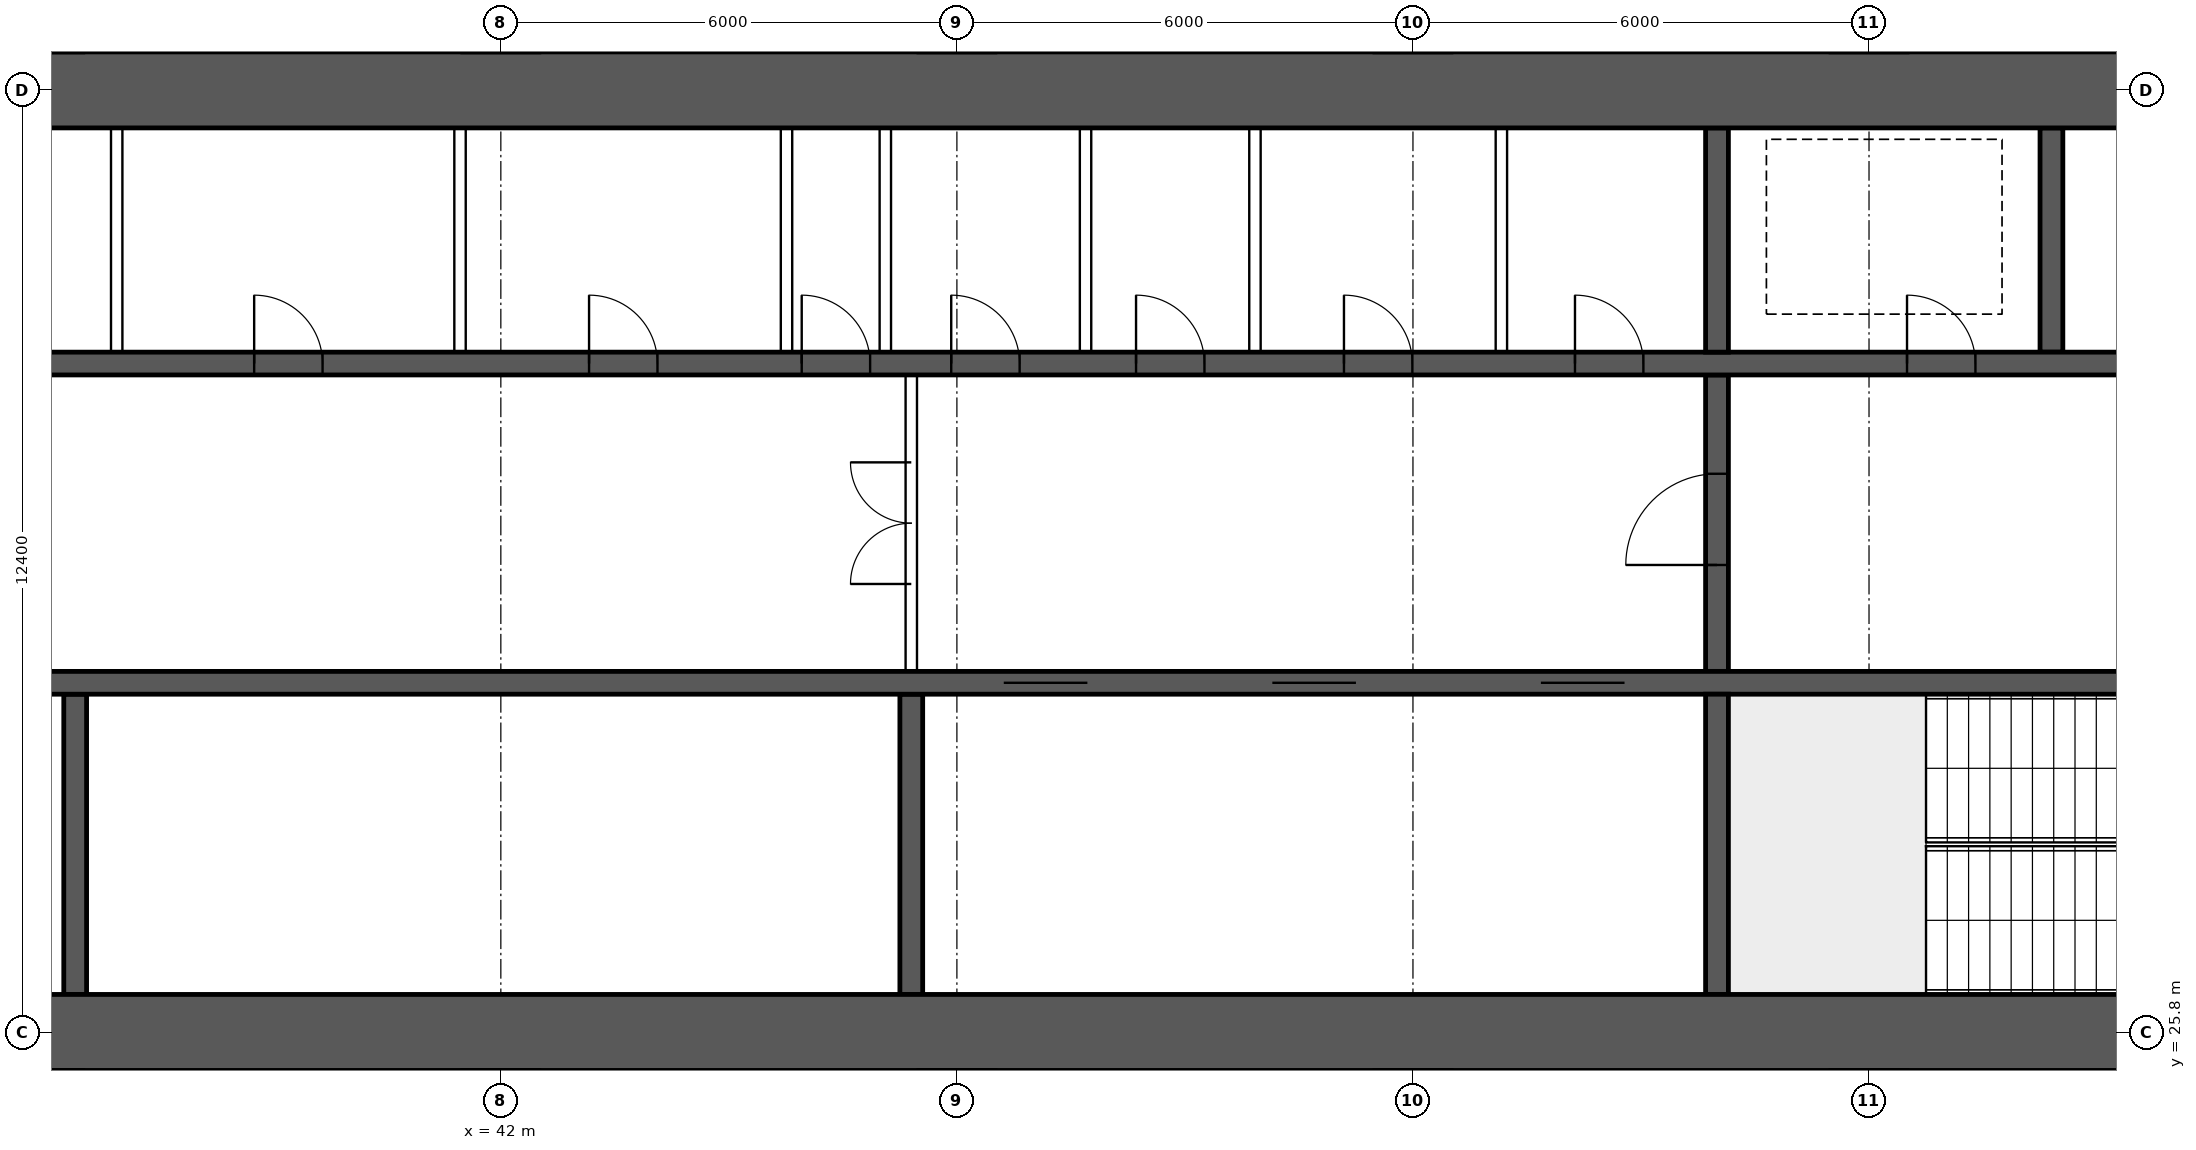
"""IFC4 building model, lengths in metres.
Left out: names, types, materials, properties, quantities, classifications, styles, units other than length and angle.
Written with IfcOpenShell. Run it as: python <this file> out.ifc"""

import sys

from ifc_helpers import new_model, si_unit, direction, frame, frame_2d, origin, place, context, subcontext, project, spatial, rectangle, extrude, element, fill, save


model = new_model("IFC4")
c1 = context("Model", 3, precision=1e-05, world=origin(), true_north=direction((0.0, 1.0)))
c2 = subcontext(c1, "Body", "Model", "MODEL_VIEW")
j1 = project(units=[si_unit("LENGTHUNIT", "METRE"), si_unit("PLANEANGLEUNIT", "RADIAN")], contexts=[c1])
p1 = place(None, origin())
s1 = spatial("IfcSite", under=j1, at=p1, CompositionType="ELEMENT")
p2 = place(p1, origin())
s2 = spatial("IfcBuilding", under=s1, at=p2, CompositionType="ELEMENT")
p3 = place(p2, frame((0.0, 0.0, 27.7)))
s3 = spatial("IfcBuildingStorey", under=s2, at=p3, CompositionType="ELEMENT", Elevation=27.7)
for number, where, z_axis, x_axis in (
    (1, (18.0, 25.8, 0.0), (0.0, 0.0, 1.0), (1.0, 0.0, 0.0)),
    (2, (18.0, 38.2, 0.0), (0.0, 0.0, 1.0), (1.0, 0.0, 0.0)),
):
    element("IfcWall", number, at=place(p3, frame(where, z_axis=z_axis, x_axis=x_axis)), inside=s3, PredefinedType="SHEAR", context=c2, shape_type="SweptSolid", body=[
        extrude(rectangle(XDim=48.0, YDim=1.0, at=frame_2d((24.0, 0.0))), origin(), (0.0, 0.0, 1.0), 3.75),
    ])
p4 = place(p3, frame((18.5, 30.4, 0.0), z_axis=(0.0, 0.0, 1.0), x_axis=(1.0, 0.0, 0.0)))
e3 = element("IfcWall", 3, at=p4, inside=s3, PredefinedType="SHEAR", context=c2, shape_type="SweptSolid", body=[
    extrude(rectangle(XDim=47.0, YDim=0.3, at=frame_2d((23.5, 0.0))), origin(), (0.0, 0.0, 1.0), 3.75),
])
p5 = place(p4, frame((0.4, 0.0, 0.0)))
e4 = element("IfcOpeningElement", 4, at=p5, cuts=e3, PredefinedType="OPENING", context=c2, shape_type="SweptSolid", body=[
    extrude(rectangle(XDim=1.0, YDim=2.1, at=frame_2d((0.5, 1.05))), frame((0.0, 0.16, 0.0), z_axis=(0.0, -1.0, 0.0), x_axis=(1.0, 0.0, 0.0)), (0.0, 0.0, 1.0), 0.32),
])
p6 = place(p4, frame((45.6, 0.0, 0.0)))
e5 = element("IfcOpeningElement", 5, at=p6, cuts=e3, PredefinedType="OPENING", context=c2, shape_type="SweptSolid", body=[
    extrude(rectangle(XDim=1.0, YDim=2.1, at=frame_2d((0.5, 1.05))), frame((0.0, 0.16, 0.0), z_axis=(0.0, -1.0, 0.0), x_axis=(1.0, 0.0, 0.0)), (0.0, 0.0, 1.0), 0.32),
])
p7 = place(p4, frame((8.25, 0.0, 0.0)))
e6 = element("IfcOpeningElement", 6, at=p7, cuts=e3, PredefinedType="OPENING", context=c2, shape_type="SweptSolid", body=[
    extrude(rectangle(XDim=1.1, YDim=2.1, at=frame_2d((0.55, 1.05))), frame((0.0, 0.16, 0.0), z_axis=(0.0, -1.0, 0.0), x_axis=(1.0, 0.0, 0.0)), (0.0, 0.0, 1.0), 0.32),
])
p8 = place(p4, frame((10.85, 0.0, 0.0)))
e7 = element("IfcOpeningElement", 7, at=p8, cuts=e3, PredefinedType="OPENING", context=c2, shape_type="SweptSolid", body=[
    extrude(rectangle(XDim=1.1, YDim=2.1, at=frame_2d((0.55, 1.05))), frame((0.0, 0.16, 0.0), z_axis=(0.0, -1.0, 0.0), x_axis=(1.0, 0.0, 0.0)), (0.0, 0.0, 1.0), 0.32),
])
p9 = place(p4, frame((13.45, 0.0, 0.0)))
e8 = element("IfcOpeningElement", 8, at=p9, cuts=e3, PredefinedType="OPENING", context=c2, shape_type="SweptSolid", body=[
    extrude(rectangle(XDim=1.1, YDim=2.1, at=frame_2d((0.55, 1.05))), frame((0.0, 0.16, 0.0), z_axis=(0.0, -1.0, 0.0), x_axis=(1.0, 0.0, 0.0)), (0.0, 0.0, 1.0), 0.32),
])
p10 = place(p4, frame((16.05, 0.0, 0.0)))
e9 = element("IfcOpeningElement", 9, at=p10, cuts=e3, PredefinedType="OPENING", context=c2, shape_type="SweptSolid", body=[
    extrude(rectangle(XDim=1.1, YDim=2.1, at=frame_2d((0.55, 1.05))), frame((0.0, 0.16, 0.0), z_axis=(0.0, -1.0, 0.0), x_axis=(1.0, 0.0, 0.0)), (0.0, 0.0, 1.0), 0.32),
])
p11 = place(p4, frame((30.117, 0.0, 0.0)))
e10 = element("IfcOpeningElement", 10, at=p11, cuts=e3, PredefinedType="OPENING", context=c2, shape_type="SweptSolid", body=[
    extrude(rectangle(XDim=1.1, YDim=2.1, at=frame_2d((0.55, 1.05))), frame((0.0, 0.16, 0.0), z_axis=(0.0, -1.0, 0.0), x_axis=(1.0, 0.0, 0.0)), (0.0, 0.0, 1.0), 0.32),
])
p12 = place(p4, frame((33.65, 0.0, 0.0)))
e11 = element("IfcOpeningElement", 11, at=p12, cuts=e3, PredefinedType="OPENING", context=c2, shape_type="SweptSolid", body=[
    extrude(rectangle(XDim=1.1, YDim=2.1, at=frame_2d((0.55, 1.05))), frame((0.0, 0.16, 0.0), z_axis=(0.0, -1.0, 0.0), x_axis=(1.0, 0.0, 0.0)), (0.0, 0.0, 1.0), 0.32),
])
p13 = place(p4, frame((37.183, 0.0, 0.0)))
e12 = element("IfcOpeningElement", 12, at=p13, cuts=e3, PredefinedType="OPENING", context=c2, shape_type="SweptSolid", body=[
    extrude(rectangle(XDim=1.1, YDim=2.1, at=frame_2d((0.55, 1.05))), frame((0.0, 0.16, 0.0), z_axis=(0.0, -1.0, 0.0), x_axis=(1.0, 0.0, 0.0)), (0.0, 0.0, 1.0), 0.32),
])
p14 = place(p3, frame((18.5, 34.6, 0.0), z_axis=(0.0, 0.0, 1.0), x_axis=(1.0, 0.0, 0.0)))
e13 = element("IfcWall", 13, at=p14, inside=s3, PredefinedType="SHEAR", context=c2, shape_type="SweptSolid", body=[
    extrude(rectangle(XDim=47.0, YDim=0.3, at=frame_2d((23.5, 0.0))), origin(), (0.0, 0.0, 1.0), 3.75),
])
p15 = place(p14, frame((0.9, 0.0, 0.0)))
e14 = element("IfcOpeningElement", 14, at=p15, cuts=e13, PredefinedType="OPENING", context=c2, shape_type="SweptSolid", body=[
    extrude(rectangle(XDim=1.1, YDim=2.1, at=frame_2d((0.55, 1.05))), frame((0.0, 0.16, 0.0), z_axis=(0.0, -1.0, 0.0), x_axis=(1.0, 0.0, 0.0)), (0.0, 0.0, 1.0), 0.32),
])
p16 = place(p14, frame((45.0, 0.0, 0.0)))
e15 = element("IfcOpeningElement", 15, at=p16, cuts=e13, PredefinedType="OPENING", context=c2, shape_type="SweptSolid", body=[
    extrude(rectangle(XDim=1.1, YDim=2.1, at=frame_2d((0.55, 1.05))), frame((0.0, 0.16, 0.0), z_axis=(0.0, -1.0, 0.0), x_axis=(1.0, 0.0, 0.0)), (0.0, 0.0, 1.0), 0.32),
])
p17 = place(p14, frame((4.1, 0.0, 0.0)))
e16 = element("IfcOpeningElement", 16, at=p17, cuts=e13, PredefinedType="OPENING", context=c2, shape_type="SweptSolid", body=[
    extrude(rectangle(XDim=0.9, YDim=2.1, at=frame_2d((0.45, 1.05))), frame((0.0, 0.16, 0.0), z_axis=(0.0, -1.0, 0.0), x_axis=(1.0, 0.0, 0.0)), (0.0, 0.0, 1.0), 0.32),
])
p18 = place(p14, frame((42.0, 0.0, 0.0)))
e17 = element("IfcOpeningElement", 17, at=p18, cuts=e13, PredefinedType="OPENING", context=c2, shape_type="SweptSolid", body=[
    extrude(rectangle(XDim=0.9, YDim=2.1, at=frame_2d((0.45, 1.05))), frame((0.0, 0.16, 0.0), z_axis=(0.0, -1.0, 0.0), x_axis=(1.0, 0.0, 0.0)), (0.0, 0.0, 1.0), 0.32),
])
p19 = place(p14, frame((8.875, 0.0, 0.0)))
e18 = element("IfcOpeningElement", 18, at=p19, cuts=e13, PredefinedType="OPENING", context=c2, shape_type="SweptSolid", body=[
    extrude(rectangle(XDim=0.9, YDim=2.1, at=frame_2d((0.45, 1.05))), frame((0.0, 0.16, 0.0), z_axis=(0.0, -1.0, 0.0), x_axis=(1.0, 0.0, 0.0)), (0.0, 0.0, 1.0), 0.32),
])
p20 = place(p14, frame((12.849, 0.0, 0.0)))
e19 = element("IfcOpeningElement", 19, at=p20, cuts=e13, PredefinedType="OPENING", context=c2, shape_type="SweptSolid", body=[
    extrude(rectangle(XDim=0.9, YDim=2.1, at=frame_2d((0.45, 1.05))), frame((0.0, 0.16, 0.0), z_axis=(0.0, -1.0, 0.0), x_axis=(1.0, 0.0, 0.0)), (0.0, 0.0, 1.0), 0.32),
])
p21 = place(p14, frame((16.496, 0.0, 0.0)))
e20 = element("IfcOpeningElement", 20, at=p21, cuts=e13, PredefinedType="OPENING", context=c2, shape_type="SweptSolid", body=[
    extrude(rectangle(XDim=0.9, YDim=2.1, at=frame_2d((0.45, 1.05))), frame((0.0, 0.16, 0.0), z_axis=(0.0, -1.0, 0.0), x_axis=(1.0, 0.0, 0.0)), (0.0, 0.0, 1.0), 0.32),
])
p22 = place(p14, frame((20.255, 0.0, 0.0)))
e21 = element("IfcOpeningElement", 21, at=p22, cuts=e13, PredefinedType="OPENING", context=c2, shape_type="SweptSolid", body=[
    extrude(rectangle(XDim=0.9, YDim=2.1, at=frame_2d((0.45, 1.05))), frame((0.0, 0.16, 0.0), z_axis=(0.0, -1.0, 0.0), x_axis=(1.0, 0.0, 0.0)), (0.0, 0.0, 1.0), 0.32),
])
p23 = place(p14, frame((24.661, 0.0, 0.0)))
e22 = element("IfcOpeningElement", 22, at=p23, cuts=e13, PredefinedType="OPENING", context=c2, shape_type="SweptSolid", body=[
    extrude(rectangle(XDim=0.9, YDim=2.1, at=frame_2d((0.45, 1.05))), frame((0.0, 0.16, 0.0), z_axis=(0.0, -1.0, 0.0), x_axis=(1.0, 0.0, 0.0)), (0.0, 0.0, 1.0), 0.32),
])
p24 = place(p14, frame((27.458, 0.0, 0.0)))
e23 = element("IfcOpeningElement", 23, at=p24, cuts=e13, PredefinedType="OPENING", context=c2, shape_type="SweptSolid", body=[
    extrude(rectangle(XDim=0.9, YDim=2.1, at=frame_2d((0.45, 1.05))), frame((0.0, 0.16, 0.0), z_axis=(0.0, -1.0, 0.0), x_axis=(1.0, 0.0, 0.0)), (0.0, 0.0, 1.0), 0.32),
])
p25 = place(p14, frame((29.425, 0.0, 0.0)))
e24 = element("IfcOpeningElement", 24, at=p25, cuts=e13, PredefinedType="OPENING", context=c2, shape_type="SweptSolid", body=[
    extrude(rectangle(XDim=0.9, YDim=2.1, at=frame_2d((0.45, 1.05))), frame((0.0, 0.16, 0.0), z_axis=(0.0, -1.0, 0.0), x_axis=(1.0, 0.0, 0.0)), (0.0, 0.0, 1.0), 0.32),
])
p26 = place(p14, frame((31.857, 0.0, 0.0)))
e25 = element("IfcOpeningElement", 25, at=p26, cuts=e13, PredefinedType="OPENING", context=c2, shape_type="SweptSolid", body=[
    extrude(rectangle(XDim=0.9, YDim=2.1, at=frame_2d((0.45, 1.05))), frame((0.0, 0.16, 0.0), z_axis=(0.0, -1.0, 0.0), x_axis=(1.0, 0.0, 0.0)), (0.0, 0.0, 1.0), 0.32),
])
p27 = place(p14, frame((34.592, 0.0, 0.0)))
e26 = element("IfcOpeningElement", 26, at=p27, cuts=e13, PredefinedType="OPENING", context=c2, shape_type="SweptSolid", body=[
    extrude(rectangle(XDim=0.9, YDim=2.1, at=frame_2d((0.45, 1.05))), frame((0.0, 0.16, 0.0), z_axis=(0.0, -1.0, 0.0), x_axis=(1.0, 0.0, 0.0)), (0.0, 0.0, 1.0), 0.32),
])
p28 = place(p14, frame((37.632, 0.0, 0.0)))
e27 = element("IfcOpeningElement", 27, at=p28, cuts=e13, PredefinedType="OPENING", context=c2, shape_type="SweptSolid", body=[
    extrude(rectangle(XDim=0.9, YDim=2.1, at=frame_2d((0.45, 1.05))), frame((0.0, 0.16, 0.0), z_axis=(0.0, -1.0, 0.0), x_axis=(1.0, 0.0, 0.0)), (0.0, 0.0, 1.0), 0.32),
])
p29 = place(p3, frame((58.0, 26.3, 0.0), z_axis=(0.0, 0.0, 1.0), x_axis=(0.0, 1.0, 0.0)))
e28 = element("IfcWall", 28, at=p29, inside=s3, PredefinedType="SHEAR", context=c2, shape_type="SweptSolid", body=[
    extrude(rectangle(XDim=3.95, YDim=0.3, at=frame_2d((1.975, 0.0))), origin(), (0.0, 0.0, 1.0), 3.75),
])
p30 = place(p3, frame((58.0, 30.55, 0.0), z_axis=(0.0, 0.0, 1.0), x_axis=(0.0, 1.0, 0.0)))
e29 = element("IfcWall", 29, at=p30, inside=s3, PredefinedType="SHEAR", context=c2, shape_type="SweptSolid", body=[
    extrude(rectangle(XDim=3.9, YDim=0.3, at=frame_2d((1.95, 0.0))), origin(), (0.0, 0.0, 1.0), 3.75),
])
p31 = place(p30, frame((1.4, 0.0, 0.0)))
e30 = element("IfcOpeningElement", 30, at=p31, cuts=e29, PredefinedType="OPENING", context=c2, shape_type="SweptSolid", body=[
    extrude(rectangle(XDim=1.2, YDim=2.1, at=frame_2d((0.6, 1.05))), frame((0.0, 0.16, 0.0), z_axis=(0.0, -1.0, 0.0), x_axis=(1.0, 0.0, 0.0)), (0.0, 0.0, 1.0), 0.32),
])
for number, where, z_axis, x_axis in (
    (31, (62.4, 34.75, 0.0), (0.0, 0.0, 1.0), (0.0, 1.0, 0.0)),
    (32, (58.0, 34.75, 0.0), (0.0, 0.0, 1.0), (0.0, 1.0, 0.0)),
):
    element("IfcWall", number, at=place(p3, frame(where, z_axis=z_axis, x_axis=x_axis)), inside=s3, PredefinedType="SHEAR", context=c2, shape_type="SweptSolid", body=[
        extrude(rectangle(XDim=2.95, YDim=0.3, at=frame_2d((1.475, 0.0))), origin(), (0.0, 0.0, 1.0), 3.75),
    ])
for number, where, z_axis, x_axis in (
    (33, (36.4, 26.3, 0.0), (0.0, 0.0, 1.0), (0.0, 1.0, 0.0)),
    (34, (47.4, 26.3, 0.0), (0.0, 0.0, 1.0), (0.0, 1.0, 0.0)),
):
    element("IfcWall", number, at=place(p3, frame(where, z_axis=z_axis, x_axis=x_axis)), inside=s3, PredefinedType="SHEAR", context=c2, shape_type="SweptSolid", body=[
        extrude(rectangle(XDim=3.95, YDim=0.3, at=frame_2d((1.975, 0.0))), origin(), (0.0, 0.0, 1.0), 3.75),
    ])
p32 = place(p3, frame((47.4, 30.55, 0.0), z_axis=(0.0, 0.0, 1.0), x_axis=(0.0, 1.0, 0.0)))
e35 = element("IfcWall", 35, at=p32, inside=s3, PredefinedType="SOLIDWALL", context=c2, shape_type="SweptSolid", body=[
    extrude(rectangle(XDim=3.9, YDim=0.15, at=frame_2d((1.95, 0.0))), origin(), (0.0, 0.0, 1.0), 3.5),
])
p33 = place(p32, frame((1.15, 0.0, 0.0)))
e36 = element("IfcOpeningElement", 36, at=p33, cuts=e35, PredefinedType="OPENING", context=c2, shape_type="SweptSolid", body=[
    extrude(rectangle(XDim=1.6, YDim=2.1, at=frame_2d((0.8, 1.05))), frame((0.0, 0.085, 0.0), z_axis=(0.0, -1.0, 0.0), x_axis=(1.0, 0.0, 0.0)), (0.0, 0.0, 1.0), 0.17),
])
for number, where, z_axis, x_axis in (
    (37, (36.946, 34.75, 0.0), (0.0, 0.0, 1.0), (0.0, 1.0, 0.0)),
    (38, (41.463, 34.75, 0.0), (0.0, 0.0, 1.0), (0.0, 1.0, 0.0)),
    (39, (45.758, 34.75, 0.0), (0.0, 0.0, 1.0), (0.0, 1.0, 0.0)),
    (40, (47.058, 34.75, 0.0), (0.0, 0.0, 1.0), (0.0, 1.0, 0.0)),
    (41, (49.692, 34.75, 0.0), (0.0, 0.0, 1.0), (0.0, 1.0, 0.0)),
    (42, (51.921, 34.75, 0.0), (0.0, 0.0, 1.0), (0.0, 1.0, 0.0)),
    (43, (55.163, 34.75, 0.0), (0.0, 0.0, 1.0), (0.0, 1.0, 0.0)),
):
    element("IfcWall", number, at=place(p3, frame(where, z_axis=z_axis, x_axis=x_axis)), inside=s3, PredefinedType="SOLIDWALL", context=c2, shape_type="SweptSolid", body=[
        extrude(rectangle(XDim=2.95, YDim=0.15, at=frame_2d((1.475, 0.0))), origin(), (0.0, 0.0, 1.0), 3.5),
    ])
for number, where, z_axis, x_axis in (
    (44, (38.79, 14.9, 0.0), (0.0, 0.0, 1.0), (0.0, 1.0, 0.0)),
    (45, (44.6, 14.9, 0.0), (0.0, 0.0, 1.0), (0.0, 1.0, 0.0)),
    (46, (57.6, 14.9, 0.0), (0.0, 0.0, 1.0), (0.0, 1.0, 0.0)),
):
    element("IfcWall", number, at=place(p3, frame(where, z_axis=z_axis, x_axis=x_axis)), inside=s3, PredefinedType="PARTITIONING", context=c2, shape_type="SweptSolid", body=[
        extrude(rectangle(XDim=10.4, YDim=0.15, at=frame_2d((5.2, 0.0))), origin(), (0.0, 0.0, 1.0), 3.5),
    ])
p34 = place(p33, origin())
e47 = element("IfcDoor", 47, at=p34, inside=s3, OperationType="DOUBLE_DOOR_SINGLE_SWING", PredefinedType="DOOR", context=c2, shape_type="SweptSolid", body=[
    extrude(rectangle(XDim=1.6, YDim=2.1, at=frame_2d((0.8, 1.05))), frame((0.0, 0.025, 0.0), z_axis=(0.0, -1.0, 0.0), x_axis=(1.0, 0.0, 0.0)), (0.0, 0.0, 1.0), 0.05),
])
fill(e36, e47)
p35 = place(p18, origin())
e48 = element("IfcDoor", 48, at=p35, inside=s3, OperationType="SINGLE_SWING_LEFT", PredefinedType="DOOR", context=c2, shape_type="SweptSolid", body=[
    extrude(rectangle(XDim=0.9, YDim=2.1, at=frame_2d((0.45, 1.05))), frame((0.0, 0.025, 0.0), z_axis=(0.0, -1.0, 0.0), x_axis=(1.0, 0.0, 0.0)), (0.0, 0.0, 1.0), 0.05),
])
fill(e17, e48)
p36 = place(p31, origin())
e49 = element("IfcDoor", 49, at=p36, inside=s3, OperationType="SINGLE_SWING_LEFT", PredefinedType="DOOR", context=c2, shape_type="SweptSolid", body=[
    extrude(rectangle(XDim=1.2, YDim=2.1, at=frame_2d((0.6, 1.05))), frame((0.0, 0.025, 0.0), z_axis=(0.0, -1.0, 0.0), x_axis=(1.0, 0.0, 0.0)), (0.0, 0.0, 1.0), 0.05),
])
fill(e30, e49)
p37 = place(p22, origin())
e50 = element("IfcDoor", 50, at=p37, inside=s3, OperationType="SINGLE_SWING_LEFT", PredefinedType="DOOR", context=c2, shape_type="SweptSolid", body=[
    extrude(rectangle(XDim=0.9, YDim=2.1, at=frame_2d((0.45, 1.05))), frame((0.0, 0.025, 0.0), z_axis=(0.0, -1.0, 0.0), x_axis=(1.0, 0.0, 0.0)), (0.0, 0.0, 1.0), 0.05),
])
fill(e21, e50)
p38 = place(p23, origin())
e51 = element("IfcDoor", 51, at=p38, inside=s3, OperationType="SINGLE_SWING_LEFT", PredefinedType="DOOR", context=c2, shape_type="SweptSolid", body=[
    extrude(rectangle(XDim=0.9, YDim=2.1, at=frame_2d((0.45, 1.05))), frame((0.0, 0.025, 0.0), z_axis=(0.0, -1.0, 0.0), x_axis=(1.0, 0.0, 0.0)), (0.0, 0.0, 1.0), 0.05),
])
fill(e22, e51)
p39 = place(p24, origin())
e52 = element("IfcDoor", 52, at=p39, inside=s3, OperationType="SINGLE_SWING_LEFT", PredefinedType="DOOR", context=c2, shape_type="SweptSolid", body=[
    extrude(rectangle(XDim=0.9, YDim=2.1, at=frame_2d((0.45, 1.05))), frame((0.0, 0.025, 0.0), z_axis=(0.0, -1.0, 0.0), x_axis=(1.0, 0.0, 0.0)), (0.0, 0.0, 1.0), 0.05),
])
fill(e23, e52)
p40 = place(p25, origin())
e53 = element("IfcDoor", 53, at=p40, inside=s3, OperationType="SINGLE_SWING_LEFT", PredefinedType="DOOR", context=c2, shape_type="SweptSolid", body=[
    extrude(rectangle(XDim=0.9, YDim=2.1, at=frame_2d((0.45, 1.05))), frame((0.0, 0.025, 0.0), z_axis=(0.0, -1.0, 0.0), x_axis=(1.0, 0.0, 0.0)), (0.0, 0.0, 1.0), 0.05),
])
fill(e24, e53)
p41 = place(p26, origin())
e54 = element("IfcDoor", 54, at=p41, inside=s3, OperationType="SINGLE_SWING_LEFT", PredefinedType="DOOR", context=c2, shape_type="SweptSolid", body=[
    extrude(rectangle(XDim=0.9, YDim=2.1, at=frame_2d((0.45, 1.05))), frame((0.0, 0.025, 0.0), z_axis=(0.0, -1.0, 0.0), x_axis=(1.0, 0.0, 0.0)), (0.0, 0.0, 1.0), 0.05),
])
fill(e25, e54)
p42 = place(p27, origin())
e55 = element("IfcDoor", 55, at=p42, inside=s3, OperationType="SINGLE_SWING_LEFT", PredefinedType="DOOR", context=c2, shape_type="SweptSolid", body=[
    extrude(rectangle(XDim=0.9, YDim=2.1, at=frame_2d((0.45, 1.05))), frame((0.0, 0.025, 0.0), z_axis=(0.0, -1.0, 0.0), x_axis=(1.0, 0.0, 0.0)), (0.0, 0.0, 1.0), 0.05),
])
fill(e26, e55)
p43 = place(p28, origin())
e56 = element("IfcDoor", 56, at=p43, inside=s3, OperationType="SINGLE_SWING_LEFT", PredefinedType="DOOR", context=c2, shape_type="SweptSolid", body=[
    extrude(rectangle(XDim=0.9, YDim=2.1, at=frame_2d((0.45, 1.05))), frame((0.0, 0.025, 0.0), z_axis=(0.0, -1.0, 0.0), x_axis=(1.0, 0.0, 0.0)), (0.0, 0.0, 1.0), 0.05),
])
fill(e27, e56)
p44 = place(p11, origin())
e57 = element("IfcDoor", 57, at=p44, inside=s3, OperationType="DOUBLE_DOOR_SLIDING", PredefinedType="DOOR", context=c2, shape_type="SweptSolid", body=[
    extrude(rectangle(XDim=1.1, YDim=2.1, at=frame_2d((0.55, 1.05))), frame((0.0, 0.025, 0.0), z_axis=(0.0, -1.0, 0.0), x_axis=(1.0, 0.0, 0.0)), (0.0, 0.0, 1.0), 0.05),
])
fill(e10, e57)
p45 = place(p12, origin())
e58 = element("IfcDoor", 58, at=p45, inside=s3, OperationType="DOUBLE_DOOR_SLIDING", PredefinedType="DOOR", context=c2, shape_type="SweptSolid", body=[
    extrude(rectangle(XDim=1.1, YDim=2.1, at=frame_2d((0.55, 1.05))), frame((0.0, 0.025, 0.0), z_axis=(0.0, -1.0, 0.0), x_axis=(1.0, 0.0, 0.0)), (0.0, 0.0, 1.0), 0.05),
])
fill(e11, e58)
p46 = place(p13, origin())
e59 = element("IfcDoor", 59, at=p46, inside=s3, OperationType="DOUBLE_DOOR_SLIDING", PredefinedType="DOOR", context=c2, shape_type="SweptSolid", body=[
    extrude(rectangle(XDim=1.1, YDim=2.1, at=frame_2d((0.55, 1.05))), frame((0.0, 0.025, 0.0), z_axis=(0.0, -1.0, 0.0), x_axis=(1.0, 0.0, 0.0)), (0.0, 0.0, 1.0), 0.05),
])
fill(e12, e59)
save(model, sys.argv[1])
